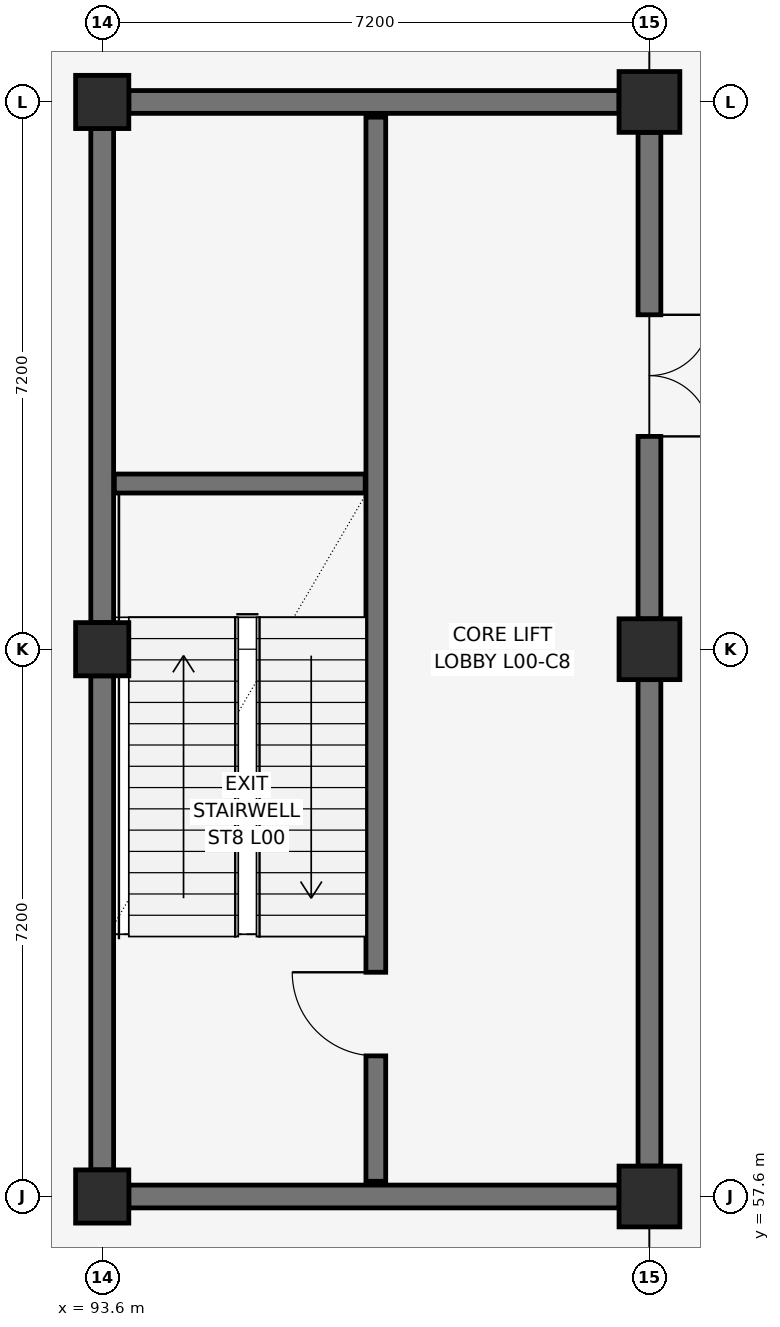
"""IFC4 building model, lengths in metres.
Left out: names, types, materials, properties, quantities, classifications, styles, units other than length and angle.
Written with IfcOpenShell. Run it as: python <this file> out.ifc"""

import sys

from ifc_helpers import new_model, si_unit, direction, frame, frame_2d, origin, origin_2d, place, context, subcontext, project, spatial, rectangle, circle, extrude, element, fill, save


model = new_model("IFC4")
c1 = context("Model", 3, precision=1e-05, world=origin(), true_north=direction((0.0, 1.0)))
c2 = subcontext(c1, "Body", "Model", "MODEL_VIEW")
j1 = project(units=[si_unit("LENGTHUNIT", "METRE"), si_unit("PLANEANGLEUNIT", "RADIAN")], contexts=[c1])
p1 = place(None, origin())
s1 = spatial("IfcSite", under=j1, at=p1, CompositionType="ELEMENT")
p2 = place(p1, origin())
s2 = spatial("IfcBuilding", under=s1, at=p2, CompositionType="ELEMENT")
p3 = place(p2, origin())
s3 = spatial("IfcBuildingStorey", under=s2, at=p3, CompositionType="ELEMENT", Elevation=0.0)
for number, where, z_axis, x_axis in (
    (1, (93.6, 57.6, 0.0), (0.0, 0.0, 1.0), (1.0, 0.0, 0.0)),
    (2, (93.6, 64.8, 0.0), (0.0, 0.0, 1.0), (1.0, 0.0, 0.0)),
    (3, (93.6, 72.0, 0.0), (0.0, 0.0, 1.0), (1.0, 0.0, 0.0)),
):
    element("IfcColumn", number, at=place(p3, frame(where, z_axis=z_axis, x_axis=x_axis)), inside=s3, PredefinedType="COLUMN", context=c2, shape_type="SweptSolid", body=[
        extrude(rectangle(XDim=0.7, YDim=0.7, at=origin_2d()), origin(), (0.0, 0.0, 1.0), 5.4),
    ])
for number, where, z_axis, x_axis in (
    (4, (100.8, 57.6, 0.0), (0.0, 0.0, 1.0), (1.0, 0.0, 0.0)),
    (5, (100.8, 64.8, 0.0), (0.0, 0.0, 1.0), (1.0, 0.0, 0.0)),
    (6, (100.8, 72.0, 0.0), (0.0, 0.0, 1.0), (1.0, 0.0, 0.0)),
):
    element("IfcColumn", number, at=place(p3, frame(where, z_axis=z_axis, x_axis=x_axis)), inside=s3, PredefinedType="COLUMN", context=c2, shape_type="SweptSolid", body=[
        extrude(circle(Radius=0.4, at=origin_2d()), origin(), (0.0, 0.0, 1.0), 5.4),
    ])
for number, where, z_axis, x_axis in (
    (7, (93.95, 57.6, 0.0), (0.0, 0.0, 1.0), (1.0, 0.0, 0.0)),
    (8, (93.95, 72.0, 0.0), (0.0, 0.0, 1.0), (1.0, 0.0, 0.0)),
):
    element("IfcWall", number, at=place(p3, frame(where, z_axis=z_axis, x_axis=x_axis)), inside=s3, PredefinedType="SHEAR", context=c2, shape_type="SweptSolid", body=[
        extrude(rectangle(XDim=6.45, YDim=0.3, at=frame_2d((3.225, 0.0))), origin(), (0.0, 0.0, 1.0), 5.14),
    ])
for number, where, z_axis, x_axis in (
    (9, (93.6, 57.95, 0.0), (0.0, 0.0, 1.0), (0.0, 1.0, 0.0)),
    (10, (93.6, 65.15, 0.0), (0.0, 0.0, 1.0), (0.0, 1.0, 0.0)),
):
    element("IfcWall", number, at=place(p3, frame(where, z_axis=z_axis, x_axis=x_axis)), inside=s3, PredefinedType="SHEAR", context=c2, shape_type="SweptSolid", body=[
        extrude(rectangle(XDim=6.5, YDim=0.3, at=frame_2d((3.25, 0.0))), origin(), (0.0, 0.0, 1.0), 5.14),
    ])
p4 = place(p3, frame((100.8, 58.0, 0.0), z_axis=(0.0, 0.0, 1.0), x_axis=(0.0, 1.0, 0.0)))
e11 = element("IfcWall", 11, at=p4, inside=s3, PredefinedType="SHEAR", context=c2, shape_type="SweptSolid", body=[
    extrude(rectangle(XDim=6.4, YDim=0.3, at=frame_2d((3.2, 0.0))), origin(), (0.0, 0.0, 1.0), 5.14),
])
p5 = place(p3, frame((100.8, 65.2, 0.0), z_axis=(0.0, 0.0, 1.0), x_axis=(0.0, 1.0, 0.0)))
e12 = element("IfcWall", 12, at=p5, inside=s3, PredefinedType="SHEAR", context=c2, shape_type="SweptSolid", body=[
    extrude(rectangle(XDim=6.4, YDim=0.3, at=frame_2d((3.2, 0.0))), origin(), (0.0, 0.0, 1.0), 5.14),
])
p6 = place(p5, frame((2.4, 0.0, 0.0)))
e13 = element("IfcOpeningElement", 13, at=p6, cuts=e12, PredefinedType="OPENING", context=c2, shape_type="SweptSolid", body=[
    extrude(rectangle(XDim=1.6, YDim=2.2, at=frame_2d((0.8, 1.1))), frame((0.0, 0.165, 0.0), z_axis=(0.0, -1.0, 0.0), x_axis=(1.0, 0.0, 0.0)), (0.0, 0.0, 1.0), 0.33),
])
p7 = place(p3, frame((97.2, 57.8, 0.0), z_axis=(0.0, 0.0, 1.0), x_axis=(0.0, 1.0, 0.0)))
e14 = element("IfcWall", 14, at=p7, inside=s3, PredefinedType="SHEAR", context=c2, shape_type="SweptSolid", body=[
    extrude(rectangle(XDim=14.0, YDim=0.26, at=frame_2d((7.0, 0.0))), origin(), (0.0, 0.0, 1.0), 5.14),
])
p8 = place(p7, frame((1.65, 0.0, 0.0)))
e15 = element("IfcOpeningElement", 15, at=p8, cuts=e14, PredefinedType="OPENING", context=c2, shape_type="SweptSolid", body=[
    extrude(rectangle(XDim=1.1, YDim=2.15, at=frame_2d((0.55, 1.075))), frame((0.0, 0.145, 0.0), z_axis=(0.0, -1.0, 0.0), x_axis=(1.0, 0.0, 0.0)), (0.0, 0.0, 1.0), 0.29),
])
p9 = place(p3, frame((93.76, 66.98, 0.0), z_axis=(0.0, 0.0, 1.0), x_axis=(1.0, 0.0, 0.0)))
e16 = element("IfcWall", 16, at=p9, inside=s3, PredefinedType="SHEAR", context=c2, shape_type="SweptSolid", body=[
    extrude(rectangle(XDim=3.3, YDim=0.25, at=frame_2d((1.65, 0.0))), origin(), (0.0, 0.0, 1.0), 5.14),
])
p10 = place(p8, origin())
e17 = element("IfcDoor", 17, at=p10, inside=s3, OperationType="SINGLE_SWING_RIGHT", PredefinedType="DOOR", context=c2, shape_type="SweptSolid", body=[
    extrude(rectangle(XDim=1.1, YDim=2.15, at=frame_2d((0.55, 1.075))), frame((0.0, 0.025, 0.0), z_axis=(0.0, -1.0, 0.0), x_axis=(1.0, 0.0, 0.0)), (0.0, 0.0, 1.0), 0.05),
])
fill(e15, e17)
p11 = place(p6, frame((1.6, 0.0, 0.0), z_axis=(0.0, 0.0, 1.0), x_axis=(-1.0, 0.0, 0.0)))
e18 = element("IfcDoor", 18, at=p11, inside=s3, OperationType="DOUBLE_SWING_LEFT", PredefinedType="DOOR", context=c2, shape_type="SweptSolid", body=[
    extrude(rectangle(XDim=1.6, YDim=2.2, at=frame_2d((0.8, 1.1))), frame((0.0, 0.025, 0.0), z_axis=(0.0, -1.0, 0.0), x_axis=(1.0, 0.0, 0.0)), (0.0, 0.0, 1.0), 0.05),
])
fill(e13, e18)
save(model, sys.argv[1])
